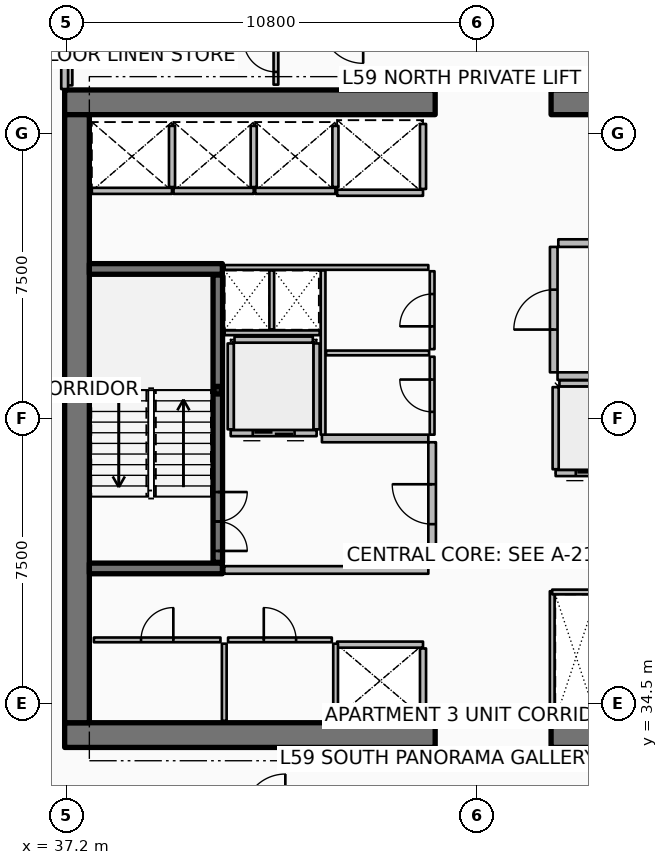
"""IFC4 building model, lengths in metres.
Left out: names, types, materials, properties, quantities, classifications, styles, units other than length and angle.
Written with IfcOpenShell. Run it as: python <this file> out.ifc"""

import sys

from ifc_helpers import new_model, si_unit, direction, frame, frame_2d, origin, origin_2d, place, context, subcontext, project, spatial, rectangle, hollow_rectangle, extrude, element, fill, save


model = new_model("IFC4")
c1 = context("Model", 3, precision=1e-05, world=origin(), true_north=direction((0.0, 1.0)))
c2 = subcontext(c1, "Body", "Model", "MODEL_VIEW")
j1 = project(units=[si_unit("LENGTHUNIT", "METRE"), si_unit("PLANEANGLEUNIT", "RADIAN")], contexts=[c1])
p1 = place(None, origin())
s1 = spatial("IfcSite", under=j1, at=p1, CompositionType="ELEMENT")
p2 = place(p1, origin())
s2 = spatial("IfcBuilding", under=s1, at=p2, CompositionType="ELEMENT")
p3 = place(p2, frame((0.0, 0.0, 236.7)))
s3 = spatial("IfcBuildingStorey", under=s2, at=p3, CompositionType="ELEMENT", Elevation=236.7)
for number, where, z_axis, x_axis in (
    (1, (37.15, 33.675, 0.0), (0.0, 0.0, 1.0), (1.0, 0.0, 0.0)),
    (2, (49.95, 33.675, 0.0), (0.0, 0.0, 1.0), (1.0, 0.0, 0.0)),
    (3, (37.15, 50.325, 0.0), (0.0, 0.0, 1.0), (1.0, 0.0, 0.0)),
    (4, (49.95, 50.325, 0.0), (0.0, 0.0, 1.0), (1.0, 0.0, 0.0)),
):
    element("IfcWall", number, at=place(p3, frame(where, z_axis=z_axis, x_axis=x_axis)), inside=s3, PredefinedType="SHEAR", context=c2, shape_type="SweptSolid", body=[
        extrude(rectangle(XDim=9.75, YDim=0.65, at=frame_2d((4.875, 0.0))), origin(), (0.0, 0.0, 1.0), 3.85),
    ])
p4 = place(p3, frame((37.475, 34.0, 0.0), z_axis=(0.0, 0.0, 1.0), x_axis=(0.0, 1.0, 0.0)))
e5 = element("IfcWall", 5, at=p4, inside=s3, PredefinedType="SHEAR", context=c2, shape_type="SweptSolid", body=[
    extrude(rectangle(XDim=16.0, YDim=0.65, at=frame_2d((8.0, 0.0))), origin(), (0.0, 0.0, 1.0), 3.85),
])
for number, where, z_axis, x_axis in (
    (6, (37.8, 38.06, 0.0), (0.0, 0.0, 1.0), (1.0, 0.0, 0.0)),
    (7, (37.8, 45.94, 0.0), (0.0, 0.0, 1.0), (1.0, 0.0, 0.0)),
):
    element("IfcWall", number, at=place(p3, frame(where, z_axis=z_axis, x_axis=x_axis)), inside=s3, PredefinedType="SHEAR", context=c2, shape_type="SweptSolid", body=[
        extrude(rectangle(XDim=3.5, YDim=0.28, at=frame_2d((1.75, 0.0))), origin(), (0.0, 0.0, 1.0), 3.85),
    ])
p5 = place(p3, frame((41.18, 42.75, 0.0), z_axis=(0.0, 0.0, 1.0), x_axis=(1.0, 0.0, 0.0)))
e8 = element("IfcColumn", 8, at=p5, inside=s3, PredefinedType="COLUMN", context=c2, shape_type="SweptSolid", body=[
    extrude(hollow_rectangle(XDim=0.2, YDim=0.2, WallThickness=0.01, InnerFilletRadius=0.01, OuterFilletRadius=0.02, at=origin_2d()), origin(), (0.0, 0.0, 1.0), 1.72),
])
p6 = place(p3, frame((41.18, 38.22, 0.0), z_axis=(0.0, 0.0, 1.0), x_axis=(0.0, 1.0, 0.0)))
e9 = element("IfcWall", 9, at=p6, inside=s3, PredefinedType="SOLIDWALL", context=c2, shape_type="SweptSolid", body=[
    extrude(rectangle(XDim=7.56, YDim=0.25, at=frame_2d((3.78, 0.0))), origin(), (0.0, 0.0, 1.0), 3.59),
])
p7 = place(p6, frame((0.3, 0.0, 0.0)))
e10 = element("IfcOpeningElement", 10, at=p7, cuts=e9, PredefinedType="OPENING", context=c2, shape_type="SweptSolid", body=[
    extrude(rectangle(XDim=1.55, YDim=2.15, at=frame_2d((0.775, 1.075))), frame((0.0, 0.135, 0.0), z_axis=(0.0, -1.0, 0.0), x_axis=(1.0, 0.0, 0.0)), (0.0, 0.0, 1.0), 0.27),
])
p8 = place(p3, frame((39.975, 47.995, 0.0), z_axis=(0.0, 0.0, 1.0), x_axis=(-1.0, 0.0, 0.0)))
e11 = element("IfcWall", 11, at=p8, inside=s3, PredefinedType="PARTITIONING", context=c2, shape_type="SweptSolid", body=[
    extrude(rectangle(XDim=2.11, YDim=0.16, at=frame_2d((1.055, 0.0))), origin(), (0.0, 0.0, 1.0), 3.59),
])
p9 = place(p3, frame((39.975, 48.095, 0.0), z_axis=(0.0, 0.0, 1.0), x_axis=(0.0, 1.0, 0.0)))
e12 = element("IfcWall", 12, at=p9, inside=s3, PredefinedType="PARTITIONING", context=c2, shape_type="SweptSolid", body=[
    extrude(rectangle(XDim=1.61, YDim=0.16, at=frame_2d((0.805, 0.0))), origin(), (0.0, 0.0, 1.0), 3.59),
])
p10 = place(p3, frame((42.125, 47.995, 0.0), z_axis=(0.0, 0.0, 1.0), x_axis=(-1.0, 0.0, 0.0)))
e13 = element("IfcWall", 13, at=p10, inside=s3, PredefinedType="PARTITIONING", context=c2, shape_type="SweptSolid", body=[
    extrude(rectangle(XDim=2.11, YDim=0.16, at=frame_2d((1.055, 0.0))), origin(), (0.0, 0.0, 1.0), 3.59),
])
p11 = place(p3, frame((42.125, 48.095, 0.0), z_axis=(0.0, 0.0, 1.0), x_axis=(0.0, 1.0, 0.0)))
e14 = element("IfcWall", 14, at=p11, inside=s3, PredefinedType="PARTITIONING", context=c2, shape_type="SweptSolid", body=[
    extrude(rectangle(XDim=1.61, YDim=0.16, at=frame_2d((0.805, 0.0))), origin(), (0.0, 0.0, 1.0), 3.59),
])
p12 = place(p3, frame((44.275, 47.995, 0.0), z_axis=(0.0, 0.0, 1.0), x_axis=(-1.0, 0.0, 0.0)))
e15 = element("IfcWall", 15, at=p12, inside=s3, PredefinedType="PARTITIONING", context=c2, shape_type="SweptSolid", body=[
    extrude(rectangle(XDim=2.11, YDim=0.16, at=frame_2d((1.055, 0.0))), origin(), (0.0, 0.0, 1.0), 3.59),
])
p13 = place(p3, frame((44.275, 48.095, 0.0), z_axis=(0.0, 0.0, 1.0), x_axis=(0.0, 1.0, 0.0)))
e16 = element("IfcWall", 16, at=p13, inside=s3, PredefinedType="PARTITIONING", context=c2, shape_type="SweptSolid", body=[
    extrude(rectangle(XDim=1.61, YDim=0.16, at=frame_2d((0.805, 0.0))), origin(), (0.0, 0.0, 1.0), 3.59),
])
p14 = place(p3, frame((46.58, 47.945, 0.0), z_axis=(0.0, 0.0, 1.0), x_axis=(-1.0, 0.0, 0.0)))
e17 = element("IfcWall", 17, at=p14, inside=s3, PredefinedType="PARTITIONING", context=c2, shape_type="SweptSolid", body=[
    extrude(rectangle(XDim=2.26, YDim=0.16, at=frame_2d((1.13, 0.0))), origin(), (0.0, 0.0, 1.0), 3.59),
])
p15 = place(p3, frame((46.58, 48.045, 0.0), z_axis=(0.0, 0.0, 1.0), x_axis=(0.0, 1.0, 0.0)))
e18 = element("IfcWall", 18, at=p15, inside=s3, PredefinedType="PARTITIONING", context=c2, shape_type="SweptSolid", body=[
    extrude(rectangle(XDim=1.71, YDim=0.16, at=frame_2d((0.855, 0.0))), origin(), (0.0, 0.0, 1.0), 3.59),
])
p16 = place(p3, frame((44.32, 36.055, 0.0), z_axis=(0.0, 0.0, 1.0), x_axis=(1.0, 0.0, 0.0)))
e19 = element("IfcWall", 19, at=p16, inside=s3, PredefinedType="PARTITIONING", context=c2, shape_type="SweptSolid", body=[
    extrude(rectangle(XDim=2.26, YDim=0.16, at=frame_2d((1.13, 0.0))), origin(), (0.0, 0.0, 1.0), 3.59),
])
p17 = place(p3, frame((46.58, 34.245, 0.0), z_axis=(0.0, 0.0, 1.0), x_axis=(0.0, 1.0, 0.0)))
e20 = element("IfcWall", 20, at=p17, inside=s3, PredefinedType="PARTITIONING", context=c2, shape_type="SweptSolid", body=[
    extrude(rectangle(XDim=1.71, YDim=0.16, at=frame_2d((0.855, 0.0))), origin(), (0.0, 0.0, 1.0), 3.59),
])
p18 = place(p3, frame((43.78, 41.62, 0.0), z_axis=(0.0, 0.0, 1.0), x_axis=(-1.0, 0.0, 0.0)))
e21 = element("IfcWall", 21, at=p18, inside=s3, PredefinedType="PARTITIONING", context=c2, shape_type="SweptSolid", body=[
    extrude(rectangle(XDim=2.26, YDim=0.16, at=frame_2d((1.13, 0.0))), origin(), (0.0, 0.0, 1.0), 3.59),
])
p19 = place(p18, frame((0.58, 0.0, 0.0)))
e22 = element("IfcOpeningElement", 22, at=p19, cuts=e21, PredefinedType="OPENING", context=c2, shape_type="SweptSolid", body=[
    extrude(rectangle(XDim=1.1, YDim=2.1, at=frame_2d((0.55, 1.05))), frame((0.0, 0.09, 0.0), z_axis=(0.0, -1.0, 0.0), x_axis=(1.0, 0.0, 0.0)), (0.0, 0.0, 1.0), 0.18),
])
for number, where, z_axis, x_axis in (
    (23, (43.78, 41.72, 0.0), (0.0, 0.0, 1.0), (0.0, 1.0, 0.0)),
    (24, (41.52, 41.72, 0.0), (0.0, 0.0, 1.0), (0.0, 1.0, 0.0)),
):
    element("IfcWall", number, at=place(p3, frame(where, z_axis=z_axis, x_axis=x_axis)), inside=s3, PredefinedType="PARTITIONING", context=c2, shape_type="SweptSolid", body=[
        extrude(rectangle(XDim=2.26, YDim=0.16, at=frame_2d((1.13, 0.0))), origin(), (0.0, 0.0, 1.0), 3.59),
    ])
p20 = place(p3, frame((41.62, 44.08, 0.0), z_axis=(0.0, 0.0, 1.0), x_axis=(1.0, 0.0, 0.0)))
e25 = element("IfcWall", 25, at=p20, inside=s3, PredefinedType="PARTITIONING", context=c2, shape_type="SweptSolid", body=[
    extrude(rectangle(XDim=2.06, YDim=0.16, at=frame_2d((1.03, 0.0))), origin(), (0.0, 0.0, 1.0), 3.59),
])
p21 = place(p3, frame((52.23, 40.57, 0.0), z_axis=(0.0, 0.0, 1.0), x_axis=(-1.0, 0.0, 0.0)))
e26 = element("IfcWall", 26, at=p21, inside=s3, PredefinedType="PARTITIONING", context=c2, shape_type="SweptSolid", body=[
    extrude(rectangle(XDim=2.16, YDim=0.16, at=frame_2d((1.08, 0.0))), origin(), (0.0, 0.0, 1.0), 3.59),
])
p22 = place(p21, frame((0.53, 0.0, 0.0)))
e27 = element("IfcOpeningElement", 27, at=p22, cuts=e26, PredefinedType="OPENING", context=c2, shape_type="SweptSolid", body=[
    extrude(rectangle(XDim=1.1, YDim=2.1, at=frame_2d((0.55, 1.05))), frame((0.0, 0.09, 0.0), z_axis=(0.0, -1.0, 0.0), x_axis=(1.0, 0.0, 0.0)), (0.0, 0.0, 1.0), 0.18),
])
p23 = place(p3, frame((50.07, 40.67, 0.0), z_axis=(0.0, 0.0, 1.0), x_axis=(0.0, 1.0, 0.0)))
e28 = element("IfcWall", 28, at=p23, inside=s3, PredefinedType="PARTITIONING", context=c2, shape_type="SweptSolid", body=[
    extrude(rectangle(XDim=2.16, YDim=0.16, at=frame_2d((1.08, 0.0))), origin(), (0.0, 0.0, 1.0), 3.59),
])
p24 = place(p3, frame((50.17, 42.93, 0.0), z_axis=(0.0, 0.0, 1.0), x_axis=(1.0, 0.0, 0.0)))
e29 = element("IfcWall", 29, at=p24, inside=s3, PredefinedType="PARTITIONING", context=c2, shape_type="SweptSolid", body=[
    extrude(rectangle(XDim=1.96, YDim=0.16, at=frame_2d((0.98, 0.0))), origin(), (0.0, 0.0, 1.0), 3.59),
])
for number, where, z_axis, x_axis in (
    (30, (44.28, 34.05, 0.0), (0.0, 0.0, 1.0), (0.0, 1.0, 0.0)),
    (31, (41.35, 34.05, 0.0), (0.0, 0.0, 1.0), (0.0, 1.0, 0.0)),
):
    element("IfcWall", number, at=place(p3, frame(where, z_axis=z_axis, x_axis=x_axis)), inside=s3, PredefinedType="PARTITIONING", context=c2, shape_type="SweptSolid", body=[
        extrude(rectangle(XDim=2.03, YDim=0.125, at=frame_2d((1.015, 0.0))), origin(), (0.0, 0.0, 1.0), 3.03),
    ])
p25 = place(p3, frame((37.92, 36.18, 0.0), z_axis=(0.0, 0.0, 1.0), x_axis=(1.0, 0.0, 0.0)))
e32 = element("IfcWall", 32, at=p25, inside=s3, PredefinedType="PARTITIONING", context=c2, shape_type="SweptSolid", body=[
    extrude(rectangle(XDim=3.33, YDim=0.125, at=frame_2d((1.665, 0.0))), origin(), (0.0, 0.0, 1.0), 3.03),
])
p26 = place(p25, frame((1.24, 0.0, 0.0)))
e33 = element("IfcOpeningElement", 33, at=p26, cuts=e32, PredefinedType="OPENING", context=c2, shape_type="SweptSolid", body=[
    extrude(rectangle(XDim=0.85, YDim=2.06, at=frame_2d((0.425, 1.03))), frame((0.0, 0.073, 0.0), z_axis=(0.0, -1.0, 0.0), x_axis=(1.0, 0.0, 0.0)), (0.0, 0.0, 1.0), 0.145),
])
p27 = place(p3, frame((41.45, 36.18, 0.0), z_axis=(0.0, 0.0, 1.0), x_axis=(1.0, 0.0, 0.0)))
e34 = element("IfcWall", 34, at=p27, inside=s3, PredefinedType="PARTITIONING", context=c2, shape_type="SweptSolid", body=[
    extrude(rectangle(XDim=2.73, YDim=0.125, at=frame_2d((1.365, 0.0))), origin(), (0.0, 0.0, 1.0), 3.03),
])
p28 = place(p27, frame((0.94, 0.0, 0.0)))
e35 = element("IfcOpeningElement", 35, at=p28, cuts=e34, PredefinedType="OPENING", context=c2, shape_type="SweptSolid", body=[
    extrude(rectangle(XDim=0.85, YDim=2.06, at=frame_2d((0.425, 1.03))), frame((0.0, 0.073, 0.0), z_axis=(0.0, -1.0, 0.0), x_axis=(1.0, 0.0, 0.0)), (0.0, 0.0, 1.0), 0.145),
])
p29 = place(p3, frame((41.35, 38.02, 0.0), z_axis=(0.0, 0.0, 1.0), x_axis=(1.0, 0.0, 0.0)))
e36 = element("IfcWall", 36, at=p29, inside=s3, PredefinedType="PARTITIONING", context=c2, shape_type="SweptSolid", body=[
    extrude(rectangle(XDim=5.37, YDim=0.2, at=frame_2d((2.685, 0.0))), origin(), (0.0, 0.0, 1.0), 3.59),
])
p30 = place(p3, frame((43.92, 41.48, 0.0), z_axis=(0.0, 0.0, 1.0), x_axis=(1.0, 0.0, 0.0)))
e37 = element("IfcWall", 37, at=p30, inside=s3, PredefinedType="PARTITIONING", context=c2, shape_type="SweptSolid", body=[
    extrude(rectangle(XDim=2.8, YDim=0.2, at=frame_2d((1.4, 0.0))), origin(), (0.0, 0.0, 1.0), 3.59),
])
p31 = place(p3, frame((46.82, 38.12, 0.0), z_axis=(0.0, 0.0, 1.0), x_axis=(0.0, 1.0, 0.0)))
e38 = element("IfcWall", 38, at=p31, inside=s3, PredefinedType="PARTITIONING", context=c2, shape_type="SweptSolid", body=[
    extrude(rectangle(XDim=3.26, YDim=0.2, at=frame_2d((1.63, 0.0))), origin(), (0.0, 0.0, 1.0), 3.59),
])
p32 = place(p31, frame((1.105, 0.0, 0.0)))
e39 = element("IfcOpeningElement", 39, at=p32, cuts=e38, PredefinedType="OPENING", context=c2, shape_type="SweptSolid", body=[
    extrude(rectangle(XDim=1.05, YDim=2.1, at=frame_2d((0.525, 1.05))), frame((0.0, 0.11, 0.0), z_axis=(0.0, -1.0, 0.0), x_axis=(1.0, 0.0, 0.0)), (0.0, 0.0, 1.0), 0.22),
])
p33 = place(p3, frame((50.12, 43.12, 0.0), z_axis=(0.0, 0.0, 1.0), x_axis=(1.0, 0.0, 0.0)))
e40 = element("IfcWall", 40, at=p33, inside=s3, PredefinedType="PARTITIONING", context=c2, shape_type="SweptSolid", body=[
    extrude(rectangle(XDim=8.88, YDim=0.2, at=frame_2d((4.44, 0.0))), origin(), (0.0, 0.0, 1.0), 3.59),
])
p34 = place(p3, frame((50.14, 46.62, 0.0), z_axis=(0.0, 0.0, 1.0), x_axis=(1.0, 0.0, 0.0)))
e41 = element("IfcWall", 41, at=p34, inside=s3, PredefinedType="PARTITIONING", context=c2, shape_type="SweptSolid", body=[
    extrude(rectangle(XDim=1.02, YDim=0.2, at=frame_2d((0.51, 0.0))), origin(), (0.0, 0.0, 1.0), 3.59),
])
p35 = place(p3, frame((50.02, 43.22, 0.0), z_axis=(0.0, 0.0, 1.0), x_axis=(0.0, 1.0, 0.0)))
e42 = element("IfcWall", 42, at=p35, inside=s3, PredefinedType="PARTITIONING", context=c2, shape_type="SweptSolid", body=[
    extrude(rectangle(XDim=3.3, YDim=0.2, at=frame_2d((1.65, 0.0))), origin(), (0.0, 0.0, 1.0), 3.59),
])
p36 = place(p35, frame((1.125, 0.0, 0.0)))
e43 = element("IfcOpeningElement", 43, at=p36, cuts=e42, PredefinedType="OPENING", context=c2, shape_type="SweptSolid", body=[
    extrude(rectangle(XDim=1.05, YDim=2.1, at=frame_2d((0.525, 1.05))), frame((0.0, 0.11, 0.0), z_axis=(0.0, -1.0, 0.0), x_axis=(1.0, 0.0, 0.0)), (0.0, 0.0, 1.0), 0.22),
])
p37 = place(p3, frame((41.36, 45.98, 0.0), z_axis=(0.0, 0.0, 1.0), x_axis=(1.0, 0.0, 0.0)))
e44 = element("IfcWall", 44, at=p37, inside=s3, PredefinedType="PARTITIONING", context=c2, shape_type="SweptSolid", body=[
    extrude(rectangle(XDim=5.36, YDim=0.125, at=frame_2d((2.68, 0.0))), origin(), (0.0, 0.0, 1.0), 3.03),
])
p38 = place(p3, frame((41.36, 44.26, 0.0), z_axis=(0.0, 0.0, 1.0), x_axis=(1.0, 0.0, 0.0)))
e45 = element("IfcWall", 45, at=p38, inside=s3, PredefinedType="PARTITIONING", context=c2, shape_type="SweptSolid", body=[
    extrude(rectangle(XDim=2.5, YDim=0.125, at=frame_2d((1.25, 0.0))), origin(), (0.0, 0.0, 1.0), 3.03),
])
p39 = place(p3, frame((42.6, 44.35, 0.0), z_axis=(0.0, 0.0, 1.0), x_axis=(0.0, 1.0, 0.0)))
e46 = element("IfcWall", 46, at=p39, inside=s3, PredefinedType="PARTITIONING", context=c2, shape_type="SweptSolid", body=[
    extrude(rectangle(XDim=1.55, YDim=0.125, at=frame_2d((0.775, 0.0))), origin(), (0.0, 0.0, 1.0), 3.03),
])
p40 = place(p3, frame((49.98, 34.06, 0.0), z_axis=(0.0, 0.0, 1.0), x_axis=(0.0, 1.0, 0.0)))
e47 = element("IfcWall", 47, at=p40, inside=s3, PredefinedType="PARTITIONING", context=c2, shape_type="SweptSolid", body=[
    extrude(rectangle(XDim=3.4, YDim=0.125, at=frame_2d((1.7, 0.0))), origin(), (0.0, 0.0, 1.0), 3.03),
])
p41 = place(p3, frame((49.98, 37.44, 0.0), z_axis=(0.0, 0.0, 1.0), x_axis=(1.0, 0.0, 0.0)))
e48 = element("IfcWall", 48, at=p41, inside=s3, PredefinedType="PARTITIONING", context=c2, shape_type="SweptSolid", body=[
    extrude(rectangle(XDim=1.26, YDim=0.125, at=frame_2d((0.63, 0.0))), origin(), (0.0, 0.0, 1.0), 3.03),
])
p42 = place(p3, frame((43.95, 41.58, 0.0), z_axis=(0.0, 0.0, 1.0), x_axis=(0.0, 1.0, 0.0)))
e49 = element("IfcWall", 49, at=p42, inside=s3, PredefinedType="PARTITIONING", context=c2, shape_type="SweptSolid", body=[
    extrude(rectangle(XDim=4.32, YDim=0.125, at=frame_2d((2.16, 0.0))), origin(), (0.0, 0.0, 1.0), 3.03),
])
p43 = place(p3, frame((44.03, 43.73, 0.0), z_axis=(0.0, 0.0, 1.0), x_axis=(1.0, 0.0, 0.0)))
e50 = element("IfcWall", 50, at=p43, inside=s3, PredefinedType="PARTITIONING", context=c2, shape_type="SweptSolid", body=[
    extrude(rectangle(XDim=2.71, YDim=0.125, at=frame_2d((1.355, 0.0))), origin(), (0.0, 0.0, 1.0), 3.03),
])
p44 = place(p3, frame((46.82, 41.58, 0.0), z_axis=(0.0, 0.0, 1.0), x_axis=(0.0, 1.0, 0.0)))
e51 = element("IfcWall", 51, at=p44, inside=s3, PredefinedType="PARTITIONING", context=c2, shape_type="SweptSolid", body=[
    extrude(rectangle(XDim=2.05, YDim=0.125, at=frame_2d((1.025, 0.0))), origin(), (0.0, 0.0, 1.0), 3.03),
])
p45 = place(p44, frame((0.6, 0.0, 0.0)))
e52 = element("IfcOpeningElement", 52, at=p45, cuts=e51, PredefinedType="OPENING", context=c2, shape_type="SweptSolid", body=[
    extrude(rectangle(XDim=0.85, YDim=2.06, at=frame_2d((0.425, 1.03))), frame((0.0, 0.073, 0.0), z_axis=(0.0, -1.0, 0.0), x_axis=(1.0, 0.0, 0.0)), (0.0, 0.0, 1.0), 0.145),
])
p46 = place(p3, frame((46.82, 43.83, 0.0), z_axis=(0.0, 0.0, 1.0), x_axis=(0.0, 1.0, 0.0)))
e53 = element("IfcWall", 53, at=p46, inside=s3, PredefinedType="PARTITIONING", context=c2, shape_type="SweptSolid", body=[
    extrude(rectangle(XDim=2.05, YDim=0.125, at=frame_2d((1.025, 0.0))), origin(), (0.0, 0.0, 1.0), 3.03),
])
p47 = place(p46, frame((0.6, 0.0, 0.0)))
e54 = element("IfcOpeningElement", 54, at=p47, cuts=e53, PredefinedType="OPENING", context=c2, shape_type="SweptSolid", body=[
    extrude(rectangle(XDim=0.85, YDim=2.06, at=frame_2d((0.425, 1.03))), frame((0.0, 0.073, 0.0), z_axis=(0.0, -1.0, 0.0), x_axis=(1.0, 0.0, 0.0)), (0.0, 0.0, 1.0), 0.145),
])
p48 = place(p3, frame((37.29, 50.77, 0.0), z_axis=(0.0, 0.0, 1.0), x_axis=(0.0, 1.0, 0.0)))
e55 = element("IfcWall", 55, at=p48, inside=s3, PredefinedType="PARTITIONING", context=c2, shape_type="SweptSolid", body=[
    extrude(rectangle(XDim=1.54, YDim=0.125, at=frame_2d((0.77, 0.0))), origin(), (0.0, 0.0, 1.0), 3.03),
])
p49 = place(p3, frame((42.71, 50.79, 0.0), z_axis=(0.0, 0.0, 1.0), x_axis=(0.0, 1.0, 0.0)))
e56 = element("IfcWall", 56, at=p49, inside=s3, PredefinedType="PARTITIONING", context=c2, shape_type="SweptSolid", body=[
    extrude(rectangle(XDim=1.52, YDim=0.125, at=frame_2d((0.76, 0.0))), origin(), (0.0, 0.0, 1.0), 2.957),
])
p50 = place(p49, frame((0.335, 0.0, 0.0)))
e57 = element("IfcOpeningElement", 57, at=p50, cuts=e56, PredefinedType="OPENING", context=c2, shape_type="SweptSolid", body=[
    extrude(rectangle(XDim=0.85, YDim=2.06, at=frame_2d((0.425, 1.03))), frame((0.0, 0.073, 0.0), z_axis=(0.0, -1.0, 0.0), x_axis=(1.0, 0.0, 0.0)), (0.0, 0.0, 1.0), 0.145),
])
p51 = place(p3, frame((37.15, 52.33, 0.0), z_axis=(0.0, 0.0, 1.0), x_axis=(0.0, -1.0, 0.0)))
e58 = element("IfcWall", 58, at=p51, inside=s3, PredefinedType="PARTITIONING", context=c2, shape_type="SweptSolid", body=[
    extrude(rectangle(XDim=1.656, YDim=0.18, at=frame_2d((0.828, 0.0))), origin(), (0.0, 0.0, 1.0), 2.957),
])
p52 = place(p7, origin())
e59 = element("IfcDoor", 59, at=p52, inside=s3, OperationType="DOUBLE_DOOR_SINGLE_SWING", PredefinedType="DOOR", context=c2, shape_type="SweptSolid", body=[
    extrude(rectangle(XDim=1.55, YDim=2.15, at=frame_2d((0.775, 1.075))), frame((0.0, 0.025, 0.0), z_axis=(0.0, -1.0, 0.0), x_axis=(1.0, 0.0, 0.0)), (0.0, 0.0, 1.0), 0.05),
])
fill(e10, e59)
p53 = place(p19, origin())
e60 = element("IfcDoor", 60, at=p53, inside=s3, OperationType="DOUBLE_DOOR_SLIDING", PredefinedType="DOOR", context=c2, shape_type="SweptSolid", body=[
    extrude(rectangle(XDim=1.1, YDim=2.1, at=frame_2d((0.55, 1.05))), frame((0.0, 0.025, 0.0), z_axis=(0.0, -1.0, 0.0), x_axis=(1.0, 0.0, 0.0)), (0.0, 0.0, 1.0), 0.05),
])
fill(e22, e60)
p54 = place(p22, origin())
e61 = element("IfcDoor", 61, at=p54, inside=s3, OperationType="DOUBLE_DOOR_SLIDING", PredefinedType="DOOR", context=c2, shape_type="SweptSolid", body=[
    extrude(rectangle(XDim=1.1, YDim=2.1, at=frame_2d((0.55, 1.05))), frame((0.0, 0.025, 0.0), z_axis=(0.0, -1.0, 0.0), x_axis=(1.0, 0.0, 0.0)), (0.0, 0.0, 1.0), 0.05),
])
fill(e27, e61)
p55 = place(p26, origin())
e62 = element("IfcDoor", 62, at=p55, inside=s3, OperationType="SINGLE_SWING_RIGHT", PredefinedType="DOOR", context=c2, shape_type="SweptSolid", body=[
    extrude(rectangle(XDim=0.85, YDim=2.06, at=frame_2d((0.425, 1.03))), frame((0.0, 0.025, 0.0), z_axis=(0.0, -1.0, 0.0), x_axis=(1.0, 0.0, 0.0)), (0.0, 0.0, 1.0), 0.05),
])
fill(e33, e62)
p56 = place(p28, origin())
e63 = element("IfcDoor", 63, at=p56, inside=s3, OperationType="SINGLE_SWING_LEFT", PredefinedType="DOOR", context=c2, shape_type="SweptSolid", body=[
    extrude(rectangle(XDim=0.85, YDim=2.06, at=frame_2d((0.425, 1.03))), frame((0.0, 0.025, 0.0), z_axis=(0.0, -1.0, 0.0), x_axis=(1.0, 0.0, 0.0)), (0.0, 0.0, 1.0), 0.05),
])
fill(e35, e63)
p57 = place(p32, origin())
e64 = element("IfcDoor", 64, at=p57, inside=s3, OperationType="SINGLE_SWING_RIGHT", PredefinedType="DOOR", context=c2, shape_type="SweptSolid", body=[
    extrude(rectangle(XDim=1.05, YDim=2.1, at=frame_2d((0.525, 1.05))), frame((0.0, 0.025, 0.0), z_axis=(0.0, -1.0, 0.0), x_axis=(1.0, 0.0, 0.0)), (0.0, 0.0, 1.0), 0.05),
])
fill(e39, e64)
p58 = place(p36, origin())
e65 = element("IfcDoor", 65, at=p58, inside=s3, OperationType="SINGLE_SWING_LEFT", PredefinedType="DOOR", context=c2, shape_type="SweptSolid", body=[
    extrude(rectangle(XDim=1.05, YDim=2.1, at=frame_2d((0.525, 1.05))), frame((0.0, 0.025, 0.0), z_axis=(0.0, -1.0, 0.0), x_axis=(1.0, 0.0, 0.0)), (0.0, 0.0, 1.0), 0.05),
])
fill(e43, e65)
p59 = place(p45, origin())
e66 = element("IfcDoor", 66, at=p59, inside=s3, OperationType="SINGLE_SWING_RIGHT", PredefinedType="DOOR", context=c2, shape_type="SweptSolid", body=[
    extrude(rectangle(XDim=0.85, YDim=2.06, at=frame_2d((0.425, 1.03))), frame((0.0, 0.025, 0.0), z_axis=(0.0, -1.0, 0.0), x_axis=(1.0, 0.0, 0.0)), (0.0, 0.0, 1.0), 0.05),
])
fill(e52, e66)
p60 = place(p47, origin())
e67 = element("IfcDoor", 67, at=p60, inside=s3, OperationType="SINGLE_SWING_LEFT", PredefinedType="DOOR", context=c2, shape_type="SweptSolid", body=[
    extrude(rectangle(XDim=0.85, YDim=2.06, at=frame_2d((0.425, 1.03))), frame((0.0, 0.025, 0.0), z_axis=(0.0, -1.0, 0.0), x_axis=(1.0, 0.0, 0.0)), (0.0, 0.0, 1.0), 0.05),
])
fill(e54, e67)
p61 = place(p50, origin())
e68 = element("IfcDoor", 68, at=p61, inside=s3, OperationType="SINGLE_SWING_RIGHT", PredefinedType="DOOR", context=c2, shape_type="SweptSolid", body=[
    extrude(rectangle(XDim=0.85, YDim=2.06, at=frame_2d((0.425, 1.03))), frame((0.0, 0.025, 0.0), z_axis=(0.0, -1.0, 0.0), x_axis=(1.0, 0.0, 0.0)), (0.0, 0.0, 1.0), 0.05),
])
fill(e57, e68)
save(model, sys.argv[1])
